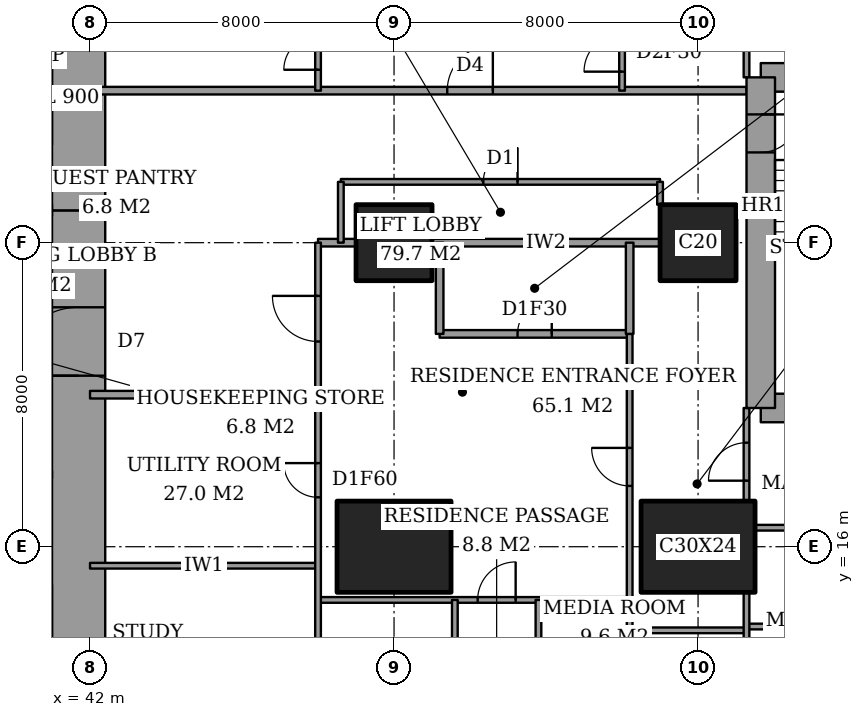
"""IFC4 building model, lengths in metres.
Left out: names, types, materials, properties, quantities, classifications, styles, units other than length and angle.
Written with IfcOpenShell. Run it as: python <this file> out.ifc"""

import sys

from ifc_helpers import new_model, si_unit, direction, frame, frame_2d, origin, origin_2d, place, context, subcontext, project, spatial, rectangle, extrude, element, fill, save


model = new_model("IFC4")
c1 = context("Model", 3, precision=1e-05, world=origin(), true_north=direction((0.0, 1.0)))
c2 = subcontext(c1, "Body", "Model", "MODEL_VIEW")
j1 = project(units=[si_unit("LENGTHUNIT", "METRE"), si_unit("PLANEANGLEUNIT", "RADIAN")], contexts=[c1])
p1 = place(None, origin())
s1 = spatial("IfcSite", under=j1, at=p1, CompositionType="ELEMENT")
p2 = place(p1, origin())
s2 = spatial("IfcBuilding", under=s1, at=p2, CompositionType="ELEMENT")
p3 = place(p2, frame((0.0, 0.0, 110.6)))
s3 = spatial("IfcBuildingStorey", under=s2, at=p3, CompositionType="ELEMENT", Elevation=110.6)
p4 = place(p3, frame((50.0, 16.0, 0.0), z_axis=(0.0, 0.0, 1.0), x_axis=(1.0, 0.0, 0.0)))
e1 = element("IfcColumn", 1, at=p4, inside=s3, PredefinedType="COLUMN", context=c2, shape_type="SweptSolid", body=[
    extrude(rectangle(XDim=3.0, YDim=2.4, at=origin_2d()), origin(), (0.0, 0.0, 1.0), 3.6),
])
p5 = place(p3, frame((50.0, 24.0, 0.0), z_axis=(0.0, 0.0, 1.0), x_axis=(1.0, 0.0, 0.0)))
e2 = element("IfcColumn", 2, at=p5, inside=s3, PredefinedType="COLUMN", context=c2, shape_type="SweptSolid", body=[
    extrude(rectangle(XDim=2.0, YDim=2.0, at=origin_2d()), origin(), (0.0, 0.0, 1.0), 3.6),
])
p6 = place(p3, frame((58.0, 16.0, 0.0), z_axis=(0.0, 0.0, 1.0), x_axis=(1.0, 0.0, 0.0)))
e3 = element("IfcColumn", 3, at=p6, inside=s3, PredefinedType="COLUMN", context=c2, shape_type="SweptSolid", body=[
    extrude(rectangle(XDim=3.0, YDim=2.4, at=origin_2d()), origin(), (0.0, 0.0, 1.0), 3.6),
])
p7 = place(p3, frame((58.0, 24.0, 0.0), z_axis=(0.0, 0.0, 1.0), x_axis=(1.0, 0.0, 0.0)))
e4 = element("IfcColumn", 4, at=p7, inside=s3, PredefinedType="COLUMN", context=c2, shape_type="SweptSolid", body=[
    extrude(rectangle(XDim=2.0, YDim=2.0, at=origin_2d()), origin(), (0.0, 0.0, 1.0), 3.6),
])
p8 = place(p3, frame((41.7, 13.0, 0.0), z_axis=(0.0, 0.0, 1.0), x_axis=(0.0, 1.0, 0.0)))
e5 = element("IfcWall", 5, at=p8, inside=s3, PredefinedType="SHEAR", context=c2, shape_type="SweptSolid", body=[
    extrude(rectangle(XDim=11.85, YDim=1.4, at=frame_2d((5.925, 0.0))), origin(), (0.0, 0.0, 1.0), 3.6),
])
p9 = place(p8, frame((7.5, 0.0, 0.0)))
e6 = element("IfcOpeningElement", 6, at=p9, cuts=e5, PredefinedType="OPENING", context=c2, shape_type="SweptSolid", body=[
    extrude(rectangle(XDim=1.8, YDim=2.4, at=frame_2d((0.9, 1.2))), frame((0.0, 0.71, 0.0), z_axis=(0.0, -1.0, 0.0), x_axis=(1.0, 0.0, 0.0)), (0.0, 0.0, 1.0), 1.42),
])
p10 = place(p3, frame((41.7, 24.85, 0.0), z_axis=(0.0, 0.0, 1.0), x_axis=(0.0, 1.0, 0.0)))
e7 = element("IfcWall", 7, at=p10, inside=s3, PredefinedType="SHEAR", context=c2, shape_type="SweptSolid", body=[
    extrude(rectangle(XDim=10.15, YDim=1.4, at=frame_2d((5.075, 0.0))), origin(), (0.0, 0.0, 1.0), 3.6),
])
for number, where, z_axis, x_axis in (
    (8, (59.65, 19.65, 0.0), (0.0, 0.0, 1.0), (1.0, 0.0, 0.0)),
    (9, (64.1, 28.35, 0.0), (0.0, 0.0, 1.0), (-1.0, 0.0, 0.0)),
):
    element("IfcWall", number, at=place(p3, frame(where, z_axis=z_axis, x_axis=x_axis)), inside=s3, PredefinedType="SHEAR", context=c2, shape_type="SweptSolid", body=[
        extrude(rectangle(XDim=4.45, YDim=0.75, at=frame_2d((2.225, 0.0))), origin(), (0.0, 0.0, 1.0), 3.6),
    ])
p11 = place(p3, frame((59.65, 28.35, 0.0), z_axis=(0.0, 0.0, 1.0), x_axis=(0.0, -1.0, 0.0)))
e10 = element("IfcWall", 10, at=p11, inside=s3, PredefinedType="SHEAR", context=c2, shape_type="SweptSolid", body=[
    extrude(rectangle(XDim=8.7, YDim=0.75, at=frame_2d((4.35, 0.0))), origin(), (0.0, 0.0, 1.0), 3.6),
])
p12 = place(p11, frame((0.975, 0.0, 0.0)))
e11 = element("IfcOpeningElement", 11, at=p12, cuts=e10, PredefinedType="OPENING", context=c2, shape_type="SweptSolid", body=[
    extrude(rectangle(XDim=1.0, YDim=2.1, at=frame_2d((0.5, 1.05))), frame((0.0, 0.385, 0.0), z_axis=(0.0, -1.0, 0.0), x_axis=(1.0, 0.0, 0.0)), (0.0, 0.0, 1.0), 0.77),
])
p13 = place(p3, frame((56.2, 13.8, 0.0), z_axis=(0.0, 0.0, 1.0), x_axis=(1.0, 0.0, 0.0)))
e12 = element("IfcWall", 12, at=p13, inside=s3, PredefinedType="PARTITIONING", context=c2, shape_type="SweptSolid", body=[
    extrude(rectangle(XDim=3.075, YDim=0.15, at=frame_2d((1.538, 0.0))), origin(), (0.0, 0.0, 1.0), 3.35),
])
p14 = place(p3, frame((59.275, 13.9, 0.0), z_axis=(0.0, 0.0, 1.0), x_axis=(1.0, 0.0, 0.0)))
e13 = element("IfcWall", 13, at=p14, inside=s3, PredefinedType="PARTITIONING", context=c2, shape_type="SweptSolid", body=[
    extrude(rectangle(XDim=2.4, YDim=0.15, at=frame_2d((1.2, 0.0))), origin(), (0.0, 0.0, 1.0), 3.35),
])
p15 = place(p3, frame((48.0, 14.6, 0.0), z_axis=(0.0, 0.0, 1.0), x_axis=(1.0, 0.0, 0.0)))
e14 = element("IfcWall", 14, at=p15, inside=s3, PredefinedType="PARTITIONING", context=c2, shape_type="SweptSolid", body=[
    extrude(rectangle(XDim=8.2, YDim=0.15, at=frame_2d((4.1, 0.0))), origin(), (0.0, 0.0, 1.0), 3.35),
])
p16 = place(p15, frame((4.2, 0.0, 0.0)))
e15 = element("IfcOpeningElement", 15, at=p16, cuts=e14, PredefinedType="OPENING", context=c2, shape_type="SweptSolid", body=[
    extrude(rectangle(XDim=1.0, YDim=2.1, at=frame_2d((0.5, 1.05))), frame((0.0, 0.085, 0.0), z_axis=(0.0, -1.0, 0.0), x_axis=(1.0, 0.0, 0.0)), (0.0, 0.0, 1.0), 0.17),
])
p17 = place(p3, frame((42.0, 15.5, 0.0), z_axis=(0.0, 0.0, 1.0), x_axis=(1.0, 0.0, 0.0)))
e16 = element("IfcWall", 16, at=p17, inside=s3, PredefinedType="PARTITIONING", context=c2, shape_type="SweptSolid", body=[
    extrude(rectangle(XDim=6.0, YDim=0.15, at=frame_2d((3.0, 0.0))), origin(), (0.0, 0.0, 1.0), 3.35),
])
p18 = place(p3, frame((59.5, 16.5, 0.0), z_axis=(0.0, 0.0, 1.0), x_axis=(1.0, 0.0, 0.0)))
e17 = element("IfcWall", 17, at=p18, inside=s3, PredefinedType="PARTITIONING", context=c2, shape_type="SweptSolid", body=[
    extrude(rectangle(XDim=5.15, YDim=0.15, at=frame_2d((2.575, 0.0))), origin(), (0.0, 0.0, 1.0), 3.35),
])
p19 = place(p3, frame((42.0, 20.0, 0.0), z_axis=(0.0, 0.0, 1.0), x_axis=(1.0, 0.0, 0.0)))
e18 = element("IfcWall", 18, at=p19, inside=s3, PredefinedType="PARTITIONING", context=c2, shape_type="SweptSolid", body=[
    extrude(rectangle(XDim=6.0, YDim=0.2, at=frame_2d((3.0, 0.0))), origin(), (0.0, 0.0, 1.0), 3.35),
])
p20 = place(p3, frame((51.2, 21.6, 0.0), z_axis=(0.0, 0.0, 1.0), x_axis=(1.0, 0.0, 0.0)))
e19 = element("IfcWall", 19, at=p20, inside=s3, PredefinedType="PARTITIONING", context=c2, shape_type="SweptSolid", body=[
    extrude(rectangle(XDim=5.0, YDim=0.2, at=frame_2d((2.5, 0.0))), origin(), (0.0, 0.0, 1.0), 3.35),
])
p21 = place(p20, frame((2.05, 0.0, 0.0)))
e20 = element("IfcOpeningElement", 20, at=p21, cuts=e19, PredefinedType="OPENING", context=c2, shape_type="SweptSolid", body=[
    extrude(rectangle(XDim=0.9, YDim=2.1, at=frame_2d((0.45, 1.05))), frame((0.0, 0.11, 0.0), z_axis=(0.0, -1.0, 0.0), x_axis=(1.0, 0.0, 0.0)), (0.0, 0.0, 1.0), 0.22),
])
p22 = place(p3, frame((48.0, 24.0, 0.0), z_axis=(0.0, 0.0, 1.0), x_axis=(1.0, 0.0, 0.0)))
e21 = element("IfcWall", 21, at=p22, inside=s3, PredefinedType="PARTITIONING", context=c2, shape_type="SweptSolid", body=[
    extrude(rectangle(XDim=1.0, YDim=0.2, at=frame_2d((0.5, 0.0))), origin(), (0.0, 0.0, 1.0), 3.35),
])
p23 = place(p3, frame((51.0, 24.0, 0.0), z_axis=(0.0, 0.0, 1.0), x_axis=(1.0, 0.0, 0.0)))
e22 = element("IfcWall", 22, at=p23, inside=s3, PredefinedType="PARTITIONING", context=c2, shape_type="SweptSolid", body=[
    extrude(rectangle(XDim=6.0, YDim=0.2, at=frame_2d((3.0, 0.0))), origin(), (0.0, 0.0, 1.0), 3.35),
])
p24 = place(p3, frame((48.6, 25.6, 0.0), z_axis=(0.0, 0.0, 1.0), x_axis=(1.0, 0.0, 0.0)))
e23 = element("IfcWall", 23, at=p24, inside=s3, PredefinedType="PARTITIONING", context=c2, shape_type="SweptSolid", body=[
    extrude(rectangle(XDim=8.4, YDim=0.15, at=frame_2d((4.2, 0.0))), origin(), (0.0, 0.0, 1.0), 3.35),
])
p25 = place(p24, frame((3.75, 0.0, 0.0)))
e24 = element("IfcOpeningElement", 24, at=p25, cuts=e23, PredefinedType="OPENING", context=c2, shape_type="SweptSolid", body=[
    extrude(rectangle(XDim=0.9, YDim=2.1, at=frame_2d((0.45, 1.05))), frame((0.0, 0.085, 0.0), z_axis=(0.0, -1.0, 0.0), x_axis=(1.0, 0.0, 0.0)), (0.0, 0.0, 1.0), 0.17),
])
p26 = place(p3, frame((42.0, 28.0, 0.0), z_axis=(0.0, 0.0, 1.0), x_axis=(1.0, 0.0, 0.0)))
e25 = element("IfcWall", 25, at=p26, inside=s3, PredefinedType="PARTITIONING", context=c2, shape_type="SweptSolid", body=[
    extrude(rectangle(XDim=17.275, YDim=0.2, at=frame_2d((8.637, 0.0))), origin(), (0.0, 0.0, 1.0), 3.35),
])
p27 = place(p26, frame((9.4, 0.0, 0.0)))
e26 = element("IfcOpeningElement", 26, at=p27, cuts=e25, PredefinedType="OPENING", context=c2, shape_type="SweptSolid", body=[
    extrude(rectangle(XDim=1.2, YDim=2.4, at=frame_2d((0.6, 1.2))), frame((0.0, 0.11, 0.0), z_axis=(0.0, -1.0, 0.0), x_axis=(1.0, 0.0, 0.0)), (0.0, 0.0, 1.0), 0.22),
])
p28 = place(p3, frame((48.0, 10.6, 0.0), z_axis=(0.0, 0.0, 1.0), x_axis=(0.0, 1.0, 0.0)))
e27 = element("IfcWall", 27, at=p28, inside=s3, PredefinedType="PARTITIONING", context=c2, shape_type="SweptSolid", body=[
    extrude(rectangle(XDim=13.4, YDim=0.15, at=frame_2d((6.7, 0.0))), origin(), (0.0, 0.0, 1.0), 3.35),
])
p29 = place(p28, frame((10.8, 0.0, 0.0)))
e28 = element("IfcOpeningElement", 28, at=p29, cuts=e27, PredefinedType="OPENING", context=c2, shape_type="SweptSolid", body=[
    extrude(rectangle(XDim=1.2, YDim=2.4, at=frame_2d((0.6, 1.2))), frame((0.0, 0.085, 0.0), z_axis=(0.0, -1.0, 0.0), x_axis=(1.0, 0.0, 0.0)), (0.0, 0.0, 1.0), 0.17),
])
p30 = place(p28, frame((6.7, 0.0, 0.0)))
e29 = element("IfcOpeningElement", 29, at=p30, cuts=e27, PredefinedType="OPENING", context=c2, shape_type="SweptSolid", body=[
    extrude(rectangle(XDim=0.9, YDim=2.1, at=frame_2d((0.45, 1.05))), frame((0.0, 0.085, 0.0), z_axis=(0.0, -1.0, 0.0), x_axis=(1.0, 0.0, 0.0)), (0.0, 0.0, 1.0), 0.17),
])
p31 = place(p3, frame((48.0, 28.0, 0.0), z_axis=(0.0, 0.0, 1.0), x_axis=(0.0, 1.0, 0.0)))
e30 = element("IfcWall", 30, at=p31, inside=s3, PredefinedType="PARTITIONING", context=c2, shape_type="SweptSolid", body=[
    extrude(rectangle(XDim=9.4, YDim=0.15, at=frame_2d((4.7, 0.0))), origin(), (0.0, 0.0, 1.0), 3.35),
])
p32 = place(p31, frame((0.55, 0.0, 0.0)))
e31 = element("IfcOpeningElement", 31, at=p32, cuts=e30, PredefinedType="OPENING", context=c2, shape_type="SweptSolid", body=[
    extrude(rectangle(XDim=0.9, YDim=2.1, at=frame_2d((0.45, 1.05))), frame((0.0, 0.085, 0.0), z_axis=(0.0, -1.0, 0.0), x_axis=(1.0, 0.0, 0.0)), (0.0, 0.0, 1.0), 0.17),
])
p33 = place(p3, frame((48.6, 24.0, 0.0), z_axis=(0.0, 0.0, 1.0), x_axis=(0.0, 1.0, 0.0)))
e32 = element("IfcWall", 32, at=p33, inside=s3, PredefinedType="PARTITIONING", context=c2, shape_type="SweptSolid", body=[
    extrude(rectangle(XDim=1.6, YDim=0.15, at=frame_2d((0.8, 0.0))), origin(), (0.0, 0.0, 1.0), 3.35),
])
p34 = place(p3, frame((51.2, 21.6, 0.0), z_axis=(0.0, 0.0, 1.0), x_axis=(0.0, 1.0, 0.0)))
e33 = element("IfcWall", 33, at=p34, inside=s3, PredefinedType="PARTITIONING", context=c2, shape_type="SweptSolid", body=[
    extrude(rectangle(XDim=2.4, YDim=0.2, at=frame_2d((1.2, 0.0))), origin(), (0.0, 0.0, 1.0), 3.35),
])
for number, where, z_axis, x_axis in (
    (34, (51.6, 10.6, 0.0), (0.0, 0.0, 1.0), (0.0, 1.0, 0.0)),
    (35, (53.8, 10.6, 0.0), (0.0, 0.0, 1.0), (0.0, 1.0, 0.0)),
):
    element("IfcWall", number, at=place(p3, frame(where, z_axis=z_axis, x_axis=x_axis)), inside=s3, PredefinedType="PARTITIONING", context=c2, shape_type="SweptSolid", body=[
        extrude(rectangle(XDim=4.0, YDim=0.15, at=frame_2d((2.0, 0.0))), origin(), (0.0, 0.0, 1.0), 3.35),
    ])
p35 = place(p3, frame((56.0, 28.0, 0.0), z_axis=(0.0, 0.0, 1.0), x_axis=(0.0, 1.0, 0.0)))
e36 = element("IfcWall", 36, at=p35, inside=s3, PredefinedType="PARTITIONING", context=c2, shape_type="SweptSolid", body=[
    extrude(rectangle(XDim=9.4, YDim=0.15, at=frame_2d((4.7, 0.0))), origin(), (0.0, 0.0, 1.0), 3.35),
])
p36 = place(p35, frame((0.5, 0.0, 0.0)))
e37 = element("IfcOpeningElement", 37, at=p36, cuts=e36, PredefinedType="OPENING", context=c2, shape_type="SweptSolid", body=[
    extrude(rectangle(XDim=1.0, YDim=2.1, at=frame_2d((0.5, 1.05))), frame((0.0, 0.085, 0.0), z_axis=(0.0, -1.0, 0.0), x_axis=(1.0, 0.0, 0.0)), (0.0, 0.0, 1.0), 0.17),
])
p37 = place(p3, frame((56.2, 21.6, 0.0), z_axis=(0.0, 0.0, 1.0), x_axis=(0.0, 1.0, 0.0)))
e38 = element("IfcWall", 38, at=p37, inside=s3, PredefinedType="PARTITIONING", context=c2, shape_type="SweptSolid", body=[
    extrude(rectangle(XDim=2.4, YDim=0.2, at=frame_2d((1.2, 0.0))), origin(), (0.0, 0.0, 1.0), 3.35),
])
p38 = place(p3, frame((56.2, 10.6, 0.0), z_axis=(0.0, 0.0, 1.0), x_axis=(0.0, 1.0, 0.0)))
e39 = element("IfcWall", 39, at=p38, inside=s3, PredefinedType="PARTITIONING", context=c2, shape_type="SweptSolid", body=[
    extrude(rectangle(XDim=11.0, YDim=0.15, at=frame_2d((5.5, 0.0))), origin(), (0.0, 0.0, 1.0), 3.35),
])
p39 = place(p38, frame((7.0, 0.0, 0.0)))
e40 = element("IfcOpeningElement", 40, at=p39, cuts=e39, PredefinedType="OPENING", context=c2, shape_type="SweptSolid", body=[
    extrude(rectangle(XDim=1.0, YDim=2.1, at=frame_2d((0.5, 1.05))), frame((0.0, 0.085, 0.0), z_axis=(0.0, -1.0, 0.0), x_axis=(1.0, 0.0, 0.0)), (0.0, 0.0, 1.0), 0.17),
])
p40 = place(p3, frame((57.0, 25.0, 0.0), z_axis=(0.0, 0.0, 1.0), x_axis=(0.0, 1.0, 0.0)))
e41 = element("IfcWall", 41, at=p40, inside=s3, PredefinedType="PARTITIONING", context=c2, shape_type="SweptSolid", body=[
    extrude(rectangle(XDim=0.6, YDim=0.15, at=frame_2d((0.3, 0.0))), origin(), (0.0, 0.0, 1.0), 3.35),
])
p41 = place(p3, frame((59.275, 10.6, 0.0), z_axis=(0.0, 0.0, 1.0), x_axis=(0.0, 1.0, 0.0)))
e42 = element("IfcWall", 42, at=p41, inside=s3, PredefinedType="PARTITIONING", context=c2, shape_type="SweptSolid", body=[
    extrude(rectangle(XDim=4.2, YDim=0.15, at=frame_2d((2.1, 0.0))), origin(), (0.0, 0.0, 1.0), 3.35),
])
p42 = place(p3, frame((59.275, 17.2, 0.0), z_axis=(0.0, 0.0, 1.0), x_axis=(0.0, 1.0, 0.0)))
e43 = element("IfcWall", 43, at=p42, inside=s3, PredefinedType="PARTITIONING", context=c2, shape_type="SweptSolid", body=[
    extrude(rectangle(XDim=2.45, YDim=0.15, at=frame_2d((1.225, 0.0))), origin(), (0.0, 0.0, 1.0), 3.35),
])
p43 = place(p42, frame((0.538, 0.0, 0.0)))
e44 = element("IfcOpeningElement", 44, at=p43, cuts=e43, PredefinedType="OPENING", context=c2, shape_type="SweptSolid", body=[
    extrude(rectangle(XDim=1.0, YDim=2.1, at=frame_2d((0.5, 1.05))), frame((0.0, 0.085, 0.0), z_axis=(0.0, -1.0, 0.0), x_axis=(1.0, 0.0, 0.0)), (0.0, 0.0, 1.0), 0.17),
])
p44 = place(p3, frame((59.275, 28.35, 0.0), z_axis=(0.0, 0.0, 1.0), x_axis=(0.0, 1.0, 0.0)))
e45 = element("IfcWall", 45, at=p44, inside=s3, PredefinedType="PARTITIONING", context=c2, shape_type="SweptSolid", body=[
    extrude(rectangle(XDim=2.45, YDim=0.15, at=frame_2d((1.225, 0.0))), origin(), (0.0, 0.0, 1.0), 3.35),
])
p45 = place(p44, frame((0.913, 0.0, 0.0)))
e46 = element("IfcOpeningElement", 46, at=p45, cuts=e45, PredefinedType="OPENING", context=c2, shape_type="SweptSolid", body=[
    extrude(rectangle(XDim=1.0, YDim=2.1, at=frame_2d((0.5, 1.05))), frame((0.0, 0.085, 0.0), z_axis=(0.0, -1.0, 0.0), x_axis=(1.0, 0.0, 0.0)), (0.0, 0.0, 1.0), 0.17),
])
p46 = place(p3, frame((28.3, 17.9, 0.0), z_axis=(0.0, 0.0, 1.0), x_axis=(1.0, 0.0, 0.0)))
e47 = element("IfcWall", 47, at=p46, inside=s3, PredefinedType="PARTITIONING", context=c2, shape_type="SweptSolid", body=[
    extrude(rectangle(XDim=12.7, YDim=0.2, at=frame_2d((6.35, 0.0))), origin(), (0.0, 0.0, 1.0), 3.6),
])
p47 = place(p46, frame((0.95, 0.0, 0.0)))
e48 = element("IfcOpeningElement", 48, at=p47, cuts=e47, PredefinedType="OPENING", context=c2, shape_type="SweptSolid", body=[
    extrude(rectangle(XDim=1.1, YDim=2.1, at=frame_2d((0.55, 1.05))), frame((0.0, 0.11, 0.0), z_axis=(0.0, -1.0, 0.0), x_axis=(1.0, 0.0, 0.0)), (0.0, 0.0, 1.0), 0.22),
])
p48 = place(p46, frame((4.15, 0.0, 0.0)))
e49 = element("IfcOpeningElement", 49, at=p48, cuts=e47, PredefinedType="OPENING", context=c2, shape_type="SweptSolid", body=[
    extrude(rectangle(XDim=1.1, YDim=2.1, at=frame_2d((0.55, 1.05))), frame((0.0, 0.11, 0.0), z_axis=(0.0, -1.0, 0.0), x_axis=(1.0, 0.0, 0.0)), (0.0, 0.0, 1.0), 0.22),
])
p49 = place(p46, frame((7.35, 0.0, 0.0)))
e50 = element("IfcOpeningElement", 50, at=p49, cuts=e47, PredefinedType="OPENING", context=c2, shape_type="SweptSolid", body=[
    extrude(rectangle(XDim=1.1, YDim=2.1, at=frame_2d((0.55, 1.05))), frame((0.0, 0.11, 0.0), z_axis=(0.0, -1.0, 0.0), x_axis=(1.0, 0.0, 0.0)), (0.0, 0.0, 1.0), 0.22),
])
p50 = place(p46, frame((10.6, 0.0, 0.0)))
e51 = element("IfcOpeningElement", 51, at=p50, cuts=e47, PredefinedType="OPENING", context=c2, shape_type="SweptSolid", body=[
    extrude(rectangle(XDim=1.2, YDim=2.1, at=frame_2d((0.6, 1.05))), frame((0.0, 0.11, 0.0), z_axis=(0.0, -1.0, 0.0), x_axis=(1.0, 0.0, 0.0)), (0.0, 0.0, 1.0), 0.22),
])
p51 = place(p43, origin())
e52 = element("IfcDoor", 52, at=p51, inside=s3, OperationType="SINGLE_SWING_RIGHT", PredefinedType="DOOR", context=c2, shape_type="SweptSolid", body=[
    extrude(rectangle(XDim=1.0, YDim=2.1, at=frame_2d((0.5, 1.05))), frame((0.0, 0.025, 0.0), z_axis=(0.0, -1.0, 0.0), x_axis=(1.0, 0.0, 0.0)), (0.0, 0.0, 1.0), 0.05),
])
fill(e44, e52)
p52 = place(p39, origin())
e53 = element("IfcDoor", 53, at=p52, inside=s3, OperationType="SINGLE_SWING_LEFT", PredefinedType="DOOR", context=c2, shape_type="SweptSolid", body=[
    extrude(rectangle(XDim=1.0, YDim=2.1, at=frame_2d((0.5, 1.05))), frame((0.0, 0.025, 0.0), z_axis=(0.0, -1.0, 0.0), x_axis=(1.0, 0.0, 0.0)), (0.0, 0.0, 1.0), 0.05),
])
fill(e40, e53)
p53 = place(p21, origin())
e54 = element("IfcDoor", 54, at=p53, inside=s3, OperationType="SINGLE_SWING_LEFT", PredefinedType="DOOR", context=c2, shape_type="SweptSolid", body=[
    extrude(rectangle(XDim=0.9, YDim=2.1, at=frame_2d((0.45, 1.05))), frame((0.0, 0.025, 0.0), z_axis=(0.0, -1.0, 0.0), x_axis=(1.0, 0.0, 0.0)), (0.0, 0.0, 1.0), 0.05),
])
fill(e20, e54)
p54 = place(p29, origin())
e55 = element("IfcDoor", 55, at=p54, inside=s3, OperationType="SINGLE_SWING_LEFT", PredefinedType="DOOR", context=c2, shape_type="SweptSolid", body=[
    extrude(rectangle(XDim=1.2, YDim=2.4, at=frame_2d((0.6, 1.2))), frame((0.0, 0.025, 0.0), z_axis=(0.0, -1.0, 0.0), x_axis=(1.0, 0.0, 0.0)), (0.0, 0.0, 1.0), 0.05),
])
fill(e28, e55)
p55 = place(p16, origin())
e56 = element("IfcDoor", 56, at=p55, inside=s3, OperationType="SINGLE_SWING_LEFT", PredefinedType="DOOR", context=c2, shape_type="SweptSolid", body=[
    extrude(rectangle(XDim=1.0, YDim=2.1, at=frame_2d((0.5, 1.05))), frame((0.0, 0.025, 0.0), z_axis=(0.0, -1.0, 0.0), x_axis=(1.0, 0.0, 0.0)), (0.0, 0.0, 1.0), 0.05),
])
fill(e15, e56)
p56 = place(p30, origin())
e57 = element("IfcDoor", 57, at=p56, inside=s3, OperationType="SINGLE_SWING_LEFT", PredefinedType="DOOR", context=c2, shape_type="SweptSolid", body=[
    extrude(rectangle(XDim=0.9, YDim=2.1, at=frame_2d((0.45, 1.05))), frame((0.0, 0.025, 0.0), z_axis=(0.0, -1.0, 0.0), x_axis=(1.0, 0.0, 0.0)), (0.0, 0.0, 1.0), 0.05),
])
fill(e29, e57)
p57 = place(p36, origin())
e58 = element("IfcDoor", 58, at=p57, inside=s3, OperationType="SINGLE_SWING_RIGHT", PredefinedType="DOOR", context=c2, shape_type="SweptSolid", body=[
    extrude(rectangle(XDim=1.0, YDim=2.1, at=frame_2d((0.5, 1.05))), frame((0.0, 0.025, 0.0), z_axis=(0.0, -1.0, 0.0), x_axis=(1.0, 0.0, 0.0)), (0.0, 0.0, 1.0), 0.05),
])
fill(e37, e58)
p58 = place(p27, origin())
e59 = element("IfcDoor", 59, at=p58, inside=s3, OperationType="SINGLE_SWING_LEFT", PredefinedType="DOOR", context=c2, shape_type="SweptSolid", body=[
    extrude(rectangle(XDim=1.2, YDim=2.4, at=frame_2d((0.6, 1.2))), frame((0.0, 0.025, 0.0), z_axis=(0.0, -1.0, 0.0), x_axis=(1.0, 0.0, 0.0)), (0.0, 0.0, 1.0), 0.05),
])
fill(e26, e59)
p59 = place(p32, origin())
e60 = element("IfcDoor", 60, at=p59, inside=s3, OperationType="SINGLE_SWING_RIGHT", PredefinedType="DOOR", context=c2, shape_type="SweptSolid", body=[
    extrude(rectangle(XDim=0.9, YDim=2.1, at=frame_2d((0.45, 1.05))), frame((0.0, 0.025, 0.0), z_axis=(0.0, -1.0, 0.0), x_axis=(1.0, 0.0, 0.0)), (0.0, 0.0, 1.0), 0.05),
])
fill(e31, e60)
p60 = place(p25, origin())
e61 = element("IfcDoor", 61, at=p60, inside=s3, OperationType="SINGLE_SWING_LEFT", PredefinedType="DOOR", context=c2, shape_type="SweptSolid", body=[
    extrude(rectangle(XDim=0.9, YDim=2.1, at=frame_2d((0.45, 1.05))), frame((0.0, 0.025, 0.0), z_axis=(0.0, -1.0, 0.0), x_axis=(1.0, 0.0, 0.0)), (0.0, 0.0, 1.0), 0.05),
])
fill(e24, e61)
p61 = place(p9, origin())
e62 = element("IfcDoor", 62, at=p61, inside=s3, OperationType="DOUBLE_DOOR_DOUBLE_SWING", PredefinedType="DOOR", context=c2, shape_type="SweptSolid", body=[
    extrude(rectangle(XDim=1.8, YDim=2.4, at=frame_2d((0.9, 1.2))), frame((0.0, 0.025, 0.0), z_axis=(0.0, -1.0, 0.0), x_axis=(1.0, 0.0, 0.0)), (0.0, 0.0, 1.0), 0.05),
])
fill(e6, e62)
p62 = place(p12, origin())
e63 = element("IfcDoor", 63, at=p62, inside=s3, OperationType="SINGLE_SWING_RIGHT", PredefinedType="DOOR", context=c2, shape_type="SweptSolid", body=[
    extrude(rectangle(XDim=1.0, YDim=2.1, at=frame_2d((0.5, 1.05))), frame((0.0, 0.025, 0.0), z_axis=(0.0, -1.0, 0.0), x_axis=(1.0, 0.0, 0.0)), (0.0, 0.0, 1.0), 0.05),
])
fill(e11, e63)
save(model, sys.argv[1])
